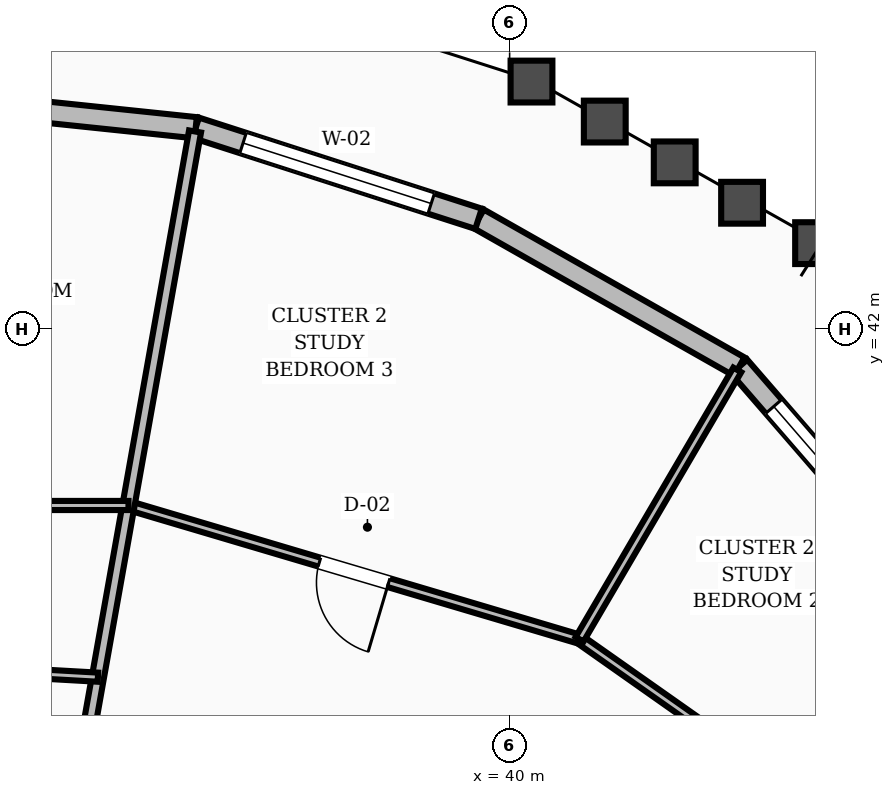
"""IFC4 building model, lengths in metres.
Left out: names, types, materials, properties, quantities, classifications, styles, units other than length and angle.
Written with IfcOpenShell. Run it as: python <this file> out.ifc"""

import sys

from ifc_helpers import new_model, si_unit, direction, frame, frame_2d, origin, place, context, subcontext, project, spatial, rectangle, extrude, element, fill, save


model = new_model("IFC4")
c1 = context("Model", 3, precision=1e-05, world=origin(), true_north=direction((0.0, 1.0)))
c2 = subcontext(c1, "Body", "Model", "MODEL_VIEW")
j1 = project(units=[si_unit("LENGTHUNIT", "METRE"), si_unit("PLANEANGLEUNIT", "RADIAN")], contexts=[c1])
p1 = place(None, origin())
s1 = spatial("IfcSite", under=j1, at=p1, CompositionType="ELEMENT")
p2 = place(p1, origin())
s2 = spatial("IfcBuilding", under=s1, at=p2, CompositionType="ELEMENT")
p3 = place(p2, frame((0.0, 0.0, 265.2)))
s3 = spatial("IfcBuildingStorey", under=s2, at=p3, CompositionType="ELEMENT", Elevation=265.2)
p4 = place(p3, frame((45.691, 38.418, 0.0), z_axis=(0.0, 0.0, 1.0), x_axis=(-0.65465247958, 0.755929977564, 0.0)))
e1 = element("IfcWall", 1, at=p4, inside=s3, PredefinedType="STANDARD", context=c2, shape_type="SweptSolid", body=[
    extrude(rectangle(XDim=4.079, YDim=0.28, at=frame_2d((2.04, 0.0))), origin(), (0.0, 0.0, 1.0), 2.88),
])
p5 = place(p4, frame((0.785, 0.0, 0.8)))
e2 = element("IfcOpeningElement", 2, at=p5, cuts=e1, PredefinedType="OPENING", context=c2, shape_type="SweptSolid", body=[
    extrude(rectangle(XDim=2.6, YDim=1.65, at=frame_2d((1.3, 0.825))), frame((0.0, 0.15, 0.0), z_axis=(0.0, -1.0, 0.0), x_axis=(1.0, 0.0, 0.0)), (0.0, 0.0, 1.0), 0.3),
])
p6 = place(p3, frame((43.021, 41.502, 0.0), z_axis=(0.0, 0.0, 1.0), x_axis=(-0.869835312163, 0.49334220346, 0.0)))
e3 = element("IfcWall", 3, at=p6, inside=s3, PredefinedType="STANDARD", context=c2, shape_type="SweptSolid", body=[
    extrude(rectangle(XDim=3.943, YDim=0.28, at=frame_2d((1.971, 0.0))), origin(), (0.0, 0.0, 1.0), 2.88),
])
p7 = place(p3, frame((39.591, 43.447, 0.0), z_axis=(0.0, 0.0, 1.0), x_axis=(-0.951905022268, 0.306393258053, 0.0)))
e4 = element("IfcWall", 4, at=p7, inside=s3, PredefinedType="STANDARD", context=c2, shape_type="SweptSolid", body=[
    extrude(rectangle(XDim=3.909, YDim=0.28, at=frame_2d((1.955, 0.0))), origin(), (0.0, 0.0, 1.0), 2.88),
])
p8 = place(p7, frame((0.655, 0.0, 0.8)))
e5 = element("IfcOpeningElement", 5, at=p8, cuts=e4, PredefinedType="OPENING", context=c2, shape_type="SweptSolid", body=[
    extrude(rectangle(XDim=2.6, YDim=1.65, at=frame_2d((1.3, 0.825))), frame((0.0, 0.15, 0.0), z_axis=(0.0, -1.0, 0.0), x_axis=(1.0, 0.0, 0.0)), (0.0, 0.0, 1.0), 0.3),
])
p9 = place(p3, frame((35.87, 44.645, 0.0), z_axis=(0.0, 0.0, 1.0), x_axis=(-0.9945804904, 0.103969457611, 0.0)))
e6 = element("IfcWall", 6, at=p9, inside=s3, PredefinedType="STANDARD", context=c2, shape_type="SweptSolid", body=[
    extrude(rectangle(XDim=3.891, YDim=0.28, at=frame_2d((1.945, 0.0))), origin(), (0.0, 0.0, 1.0), 2.88),
])
p10 = place(p3, frame((46.443, 34.028, 0.0), z_axis=(0.0, 0.0, 1.0), x_axis=(-0.817775541749, 0.5755372823, 0.0)))
e7 = element("IfcWall", 7, at=p10, inside=s3, PredefinedType="PARTITIONING", context=c2, shape_type="SweptSolid", body=[
    extrude(rectangle(XDim=6.754, YDim=0.12, at=frame_2d((3.377, 0.0))), origin(), (0.0, 0.0, 1.0), 2.87),
])
p11 = place(p10, frame((2.902, 0.0, 0.0)))
e8 = element("IfcOpeningElement", 8, at=p11, cuts=e7, PredefinedType="OPENING", context=c2, shape_type="SweptSolid", body=[
    extrude(rectangle(XDim=0.95, YDim=2.1, at=frame_2d((0.475, 1.05))), frame((0.0, 0.07, 0.0), z_axis=(0.0, -1.0, 0.0), x_axis=(1.0, 0.0, 0.0)), (0.0, 0.0, 1.0), 0.14),
])
p12 = place(p3, frame((40.92, 37.915, 0.0), z_axis=(0.0, 0.0, 1.0), x_axis=(-0.958730048682, 0.284317944833, 0.0)))
e9 = element("IfcWall", 9, at=p12, inside=s3, PredefinedType="PARTITIONING", context=c2, shape_type="SweptSolid", body=[
    extrude(rectangle(XDim=6.19, YDim=0.12, at=frame_2d((3.095, 0.0))), origin(), (0.0, 0.0, 1.0), 2.87),
])
p13 = place(p12, frame((2.62, 0.0, 0.0)))
e10 = element("IfcOpeningElement", 10, at=p13, cuts=e9, PredefinedType="OPENING", context=c2, shape_type="SweptSolid", body=[
    extrude(rectangle(XDim=0.95, YDim=2.1, at=frame_2d((0.475, 1.05))), frame((0.0, 0.07, 0.0), z_axis=(0.0, -1.0, 0.0), x_axis=(1.0, 0.0, 0.0)), (0.0, 0.0, 1.0), 0.14),
])
p14 = place(p3, frame((40.92, 37.915, 0.0), z_axis=(0.0, 0.0, 1.0), x_axis=(0.505267765721, 0.862962620814, 0.0)))
e11 = element("IfcWall", 11, at=p14, inside=s3, PredefinedType="PARTITIONING", context=c2, shape_type="SweptSolid", body=[
    extrude(rectangle(XDim=4.106, YDim=0.12, at=frame_2d((2.053, 0.0))), origin(), (0.0, 0.0, 1.0), 2.87),
])
p15 = place(p3, frame((33.86, 33.35, 0.0), z_axis=(0.0, 0.0, 1.0), x_axis=(0.175206916814, 0.984531632961, 0.0)))
e12 = element("IfcWall", 12, at=p15, inside=s3, PredefinedType="SOLIDWALL", context=c2, shape_type="SweptSolid", body=[
    extrude(rectangle(XDim=11.422, YDim=0.16, at=frame_2d((5.711, 0.0))), origin(), (0.0, 0.0, 1.0), 2.87),
])
p16 = place(p3, frame((34.583, 37.416, 0.0), z_axis=(0.0, 0.0, 1.0), x_axis=(-0.99841237493, 0.056326988077, 0.0)))
e13 = element("IfcWall", 13, at=p16, inside=s3, PredefinedType="PARTITIONING", context=c2, shape_type="SweptSolid", body=[
    extrude(rectangle(XDim=2.588, YDim=0.12, at=frame_2d((1.294, 0.0))), origin(), (0.0, 0.0, 1.0), 2.87),
])
p17 = place(p3, frame((34.986, 39.675, 0.0), z_axis=(0.0, 0.0, 1.0), x_axis=(-1.0, 0.0, 0.0)))
e14 = element("IfcWall", 14, at=p17, inside=s3, PredefinedType="PARTITIONING", context=c2, shape_type="SweptSolid", body=[
    extrude(rectangle(XDim=5.971, YDim=0.12, at=frame_2d((2.986, 0.0))), origin(), (0.0, 0.0, 1.0), 2.87),
])
p18 = place(p17, frame((3.421, 0.0, 0.0)))
e15 = element("IfcOpeningElement", 15, at=p18, cuts=e14, PredefinedType="OPENING", context=c2, shape_type="SweptSolid", body=[
    extrude(rectangle(XDim=0.95, YDim=2.1, at=frame_2d((0.475, 1.05))), frame((0.0, 0.07, 0.0), z_axis=(0.0, -1.0, 0.0), x_axis=(1.0, 0.0, 0.0)), (0.0, 0.0, 1.0), 0.14),
])
p19 = place(p5, origin())
e16 = element("IfcWindow", 16, at=p19, inside=s3, PartitioningType="SINGLE_PANEL", PredefinedType="WINDOW", context=c2, shape_type="SweptSolid", body=[
    extrude(rectangle(XDim=2.6, YDim=1.65, at=frame_2d((1.3, 0.825))), frame((0.0, 0.03, 0.0), z_axis=(0.0, -1.0, 0.0), x_axis=(1.0, 0.0, 0.0)), (0.0, 0.0, 1.0), 0.06),
])
fill(e2, e16)
p20 = place(p8, origin())
e17 = element("IfcWindow", 17, at=p20, inside=s3, PartitioningType="SINGLE_PANEL", PredefinedType="WINDOW", context=c2, shape_type="SweptSolid", body=[
    extrude(rectangle(XDim=2.6, YDim=1.65, at=frame_2d((1.3, 0.825))), frame((0.0, 0.03, 0.0), z_axis=(0.0, -1.0, 0.0), x_axis=(1.0, 0.0, 0.0)), (0.0, 0.0, 1.0), 0.06),
])
fill(e5, e17)
p21 = place(p13, origin())
e18 = element("IfcDoor", 18, at=p21, inside=s3, OperationType="SINGLE_SWING_LEFT", PredefinedType="DOOR", context=c2, shape_type="SweptSolid", body=[
    extrude(rectangle(XDim=0.95, YDim=2.1, at=frame_2d((0.475, 1.05))), frame((0.0, 0.025, 0.0), z_axis=(0.0, -1.0, 0.0), x_axis=(1.0, 0.0, 0.0)), (0.0, 0.0, 1.0), 0.05),
])
fill(e10, e18)
save(model, sys.argv[1])
